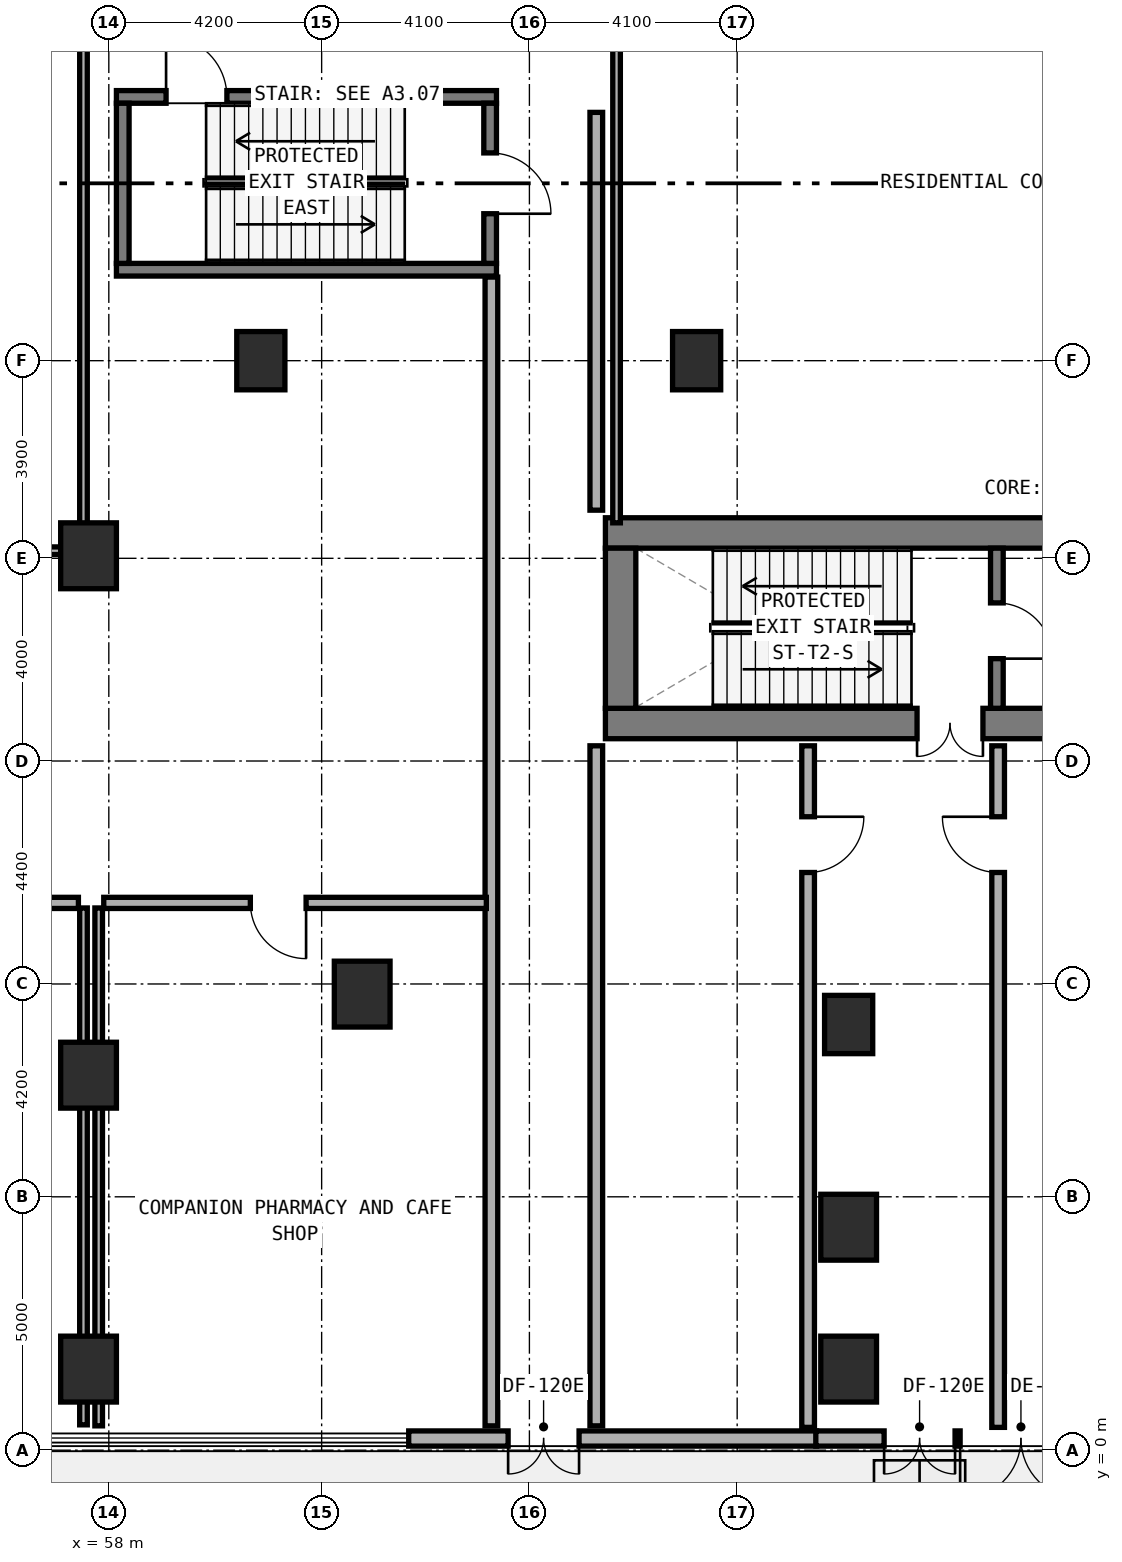
"""IFC4 building model, lengths in metres.
Left out: names, types, materials, properties, quantities, classifications, styles, units other than length and angle.
Written with IfcOpenShell. Run it as: python <this file> out.ifc"""

import sys

from ifc_helpers import new_model, si_unit, direction, frame, frame_2d, origin, origin_2d, place, context, subcontext, project, spatial, rectangle, extrude, element, fill, save


model = new_model("IFC4")
c1 = context("Model", 3, precision=1e-05, world=origin(), true_north=direction((0.0, 1.0)))
c2 = subcontext(c1, "Body", "Model", "MODEL_VIEW")
j1 = project(units=[si_unit("LENGTHUNIT", "METRE"), si_unit("PLANEANGLEUNIT", "RADIAN")], contexts=[c1])
p1 = place(None, origin())
s1 = spatial("IfcSite", under=j1, at=p1, CompositionType="ELEMENT")
p2 = place(p1, origin())
s2 = spatial("IfcBuilding", under=s1, at=p2, CompositionType="ELEMENT")
p3 = place(p2, origin())
s3 = spatial("IfcBuildingStorey", under=s2, at=p3, CompositionType="ELEMENT", Elevation=0.0)
p4 = place(p3, frame((67.8, 14.34, 0.0), z_axis=(0.0, 0.0, 1.0), x_axis=(1.0, 0.0, 0.0)))
e1 = element("IfcWall", 1, at=p4, inside=s3, PredefinedType="SHEAR", context=c2, shape_type="SweptSolid", body=[
    extrude(rectangle(XDim=18.6, YDim=0.6, at=frame_2d((9.3, 0.0))), origin(), (0.0, 0.0, 1.0), 5.4),
])
p5 = place(p4, frame((9.35, 0.0, 0.0)))
e2 = element("IfcOpeningElement", 2, at=p5, cuts=e1, PredefinedType="OPENING", context=c2, shape_type="SweptSolid", body=[
    extrude(rectangle(XDim=1.2, YDim=2.15, at=frame_2d((0.6, 1.075))), frame((0.0, 0.31, 0.0), z_axis=(0.0, -1.0, 0.0), x_axis=(1.0, 0.0, 0.0)), (0.0, 0.0, 1.0), 0.62),
])
p6 = place(p4, frame((6.15, 0.0, 0.0)))
e3 = element("IfcOpeningElement", 3, at=p6, cuts=e1, PredefinedType="OPENING", context=c2, shape_type="SweptSolid", body=[
    extrude(rectangle(XDim=1.3, YDim=2.15, at=frame_2d((0.65, 1.075))), frame((0.0, 0.31, 0.0), z_axis=(0.0, -1.0, 0.0), x_axis=(1.0, 0.0, 0.0)), (0.0, 0.0, 1.0), 0.62),
])
p7 = place(p4, frame((16.95, 0.0, 0.0)))
e4 = element("IfcOpeningElement", 4, at=p7, cuts=e1, PredefinedType="OPENING", context=c2, shape_type="SweptSolid", body=[
    extrude(rectangle(XDim=0.85, YDim=2.1, at=frame_2d((0.425, 1.05))), frame((0.0, 0.31, 0.0), z_axis=(0.0, -1.0, 0.0), x_axis=(1.0, 0.0, 0.0)), (0.0, 0.0, 1.0), 0.62),
])
p8 = place(p4, frame((12.55, 0.0, 0.0)))
e5 = element("IfcOpeningElement", 5, at=p8, cuts=e1, PredefinedType="OPENING", context=c2, shape_type="SweptSolid", body=[
    extrude(rectangle(XDim=1.1, YDim=2.15, at=frame_2d((0.55, 1.075))), frame((0.0, 0.31, 0.0), z_axis=(0.0, -1.0, 0.0), x_axis=(1.0, 0.0, 0.0)), (0.0, 0.0, 1.0), 0.62),
])
p9 = place(p4, frame((14.15, 0.0, 0.0)))
e6 = element("IfcOpeningElement", 6, at=p9, cuts=e1, PredefinedType="OPENING", context=c2, shape_type="SweptSolid", body=[
    extrude(rectangle(XDim=1.1, YDim=2.15, at=frame_2d((0.55, 1.075))), frame((0.0, 0.31, 0.0), z_axis=(0.0, -1.0, 0.0), x_axis=(1.0, 0.0, 0.0)), (0.0, 0.0, 1.0), 0.62),
])
p10 = place(p3, frame((67.8, 18.1, 0.0), z_axis=(0.0, 0.0, 1.0), x_axis=(1.0, 0.0, 0.0)))
e7 = element("IfcWall", 7, at=p10, inside=s3, PredefinedType="SHEAR", context=c2, shape_type="SweptSolid", body=[
    extrude(rectangle(XDim=18.6, YDim=0.6, at=frame_2d((9.3, 0.0))), origin(), (0.0, 0.0, 1.0), 5.4),
])
p11 = place(p3, frame((68.1, 14.64, 0.0), z_axis=(0.0, 0.0, 1.0), x_axis=(0.0, 1.0, 0.0)))
e8 = element("IfcWall", 8, at=p11, inside=s3, PredefinedType="SHEAR", context=c2, shape_type="SweptSolid", body=[
    extrude(rectangle(XDim=3.16, YDim=0.6, at=frame_2d((1.58, 0.0))), origin(), (0.0, 0.0, 1.0), 5.4),
])
p12 = place(p3, frame((75.525, 14.64, 0.0), z_axis=(0.0, 0.0, 1.0), x_axis=(0.0, 1.0, 0.0)))
e9 = element("IfcWall", 9, at=p12, inside=s3, PredefinedType="STANDARD", context=c2, shape_type="SweptSolid", body=[
    extrude(rectangle(XDim=3.16, YDim=0.25, at=frame_2d((1.58, 0.0))), origin(), (0.0, 0.0, 1.0), 5.05),
])
p13 = place(p12, frame((0.98, 0.0, 0.0)))
e10 = element("IfcOpeningElement", 10, at=p13, cuts=e9, PredefinedType="OPENING", context=c2, shape_type="SweptSolid", body=[
    extrude(rectangle(XDim=1.1, YDim=2.15, at=frame_2d((0.55, 1.075))), frame((0.0, 0.135, 0.0), z_axis=(0.0, -1.0, 0.0), x_axis=(1.0, 0.0, 0.0)), (0.0, 0.0, 1.0), 0.27),
])
p14 = place(p3, frame((58.15, 23.295, 0.0), z_axis=(0.0, 0.0, 1.0), x_axis=(1.0, 0.0, 0.0)))
e11 = element("IfcWall", 11, at=p14, inside=s3, PredefinedType="STANDARD", context=c2, shape_type="SweptSolid", body=[
    extrude(rectangle(XDim=7.5, YDim=0.25, at=frame_2d((3.75, 0.0))), origin(), (0.0, 0.0, 1.0), 5.4),
])
p15 = place(p3, frame((58.15, 26.705, 0.0), z_axis=(0.0, 0.0, 1.0), x_axis=(1.0, 0.0, 0.0)))
e12 = element("IfcWall", 12, at=p15, inside=s3, PredefinedType="STANDARD", context=c2, shape_type="SweptSolid", body=[
    extrude(rectangle(XDim=7.5, YDim=0.25, at=frame_2d((3.75, 0.0))), origin(), (0.0, 0.0, 1.0), 5.4),
])
p16 = place(p15, frame((0.98, 0.0, 0.0)))
e13 = element("IfcOpeningElement", 13, at=p16, cuts=e12, PredefinedType="OPENING", context=c2, shape_type="SweptSolid", body=[
    extrude(rectangle(XDim=1.2, YDim=2.15, at=frame_2d((0.6, 1.075))), frame((0.0, 0.135, 0.0), z_axis=(0.0, -1.0, 0.0), x_axis=(1.0, 0.0, 0.0)), (0.0, 0.0, 1.0), 0.27),
])
p17 = place(p3, frame((58.275, 23.42, 0.0), z_axis=(0.0, 0.0, 1.0), x_axis=(0.0, 1.0, 0.0)))
e14 = element("IfcWall", 14, at=p17, inside=s3, PredefinedType="STANDARD", context=c2, shape_type="SweptSolid", body=[
    extrude(rectangle(XDim=3.16, YDim=0.25, at=frame_2d((1.58, 0.0))), origin(), (0.0, 0.0, 1.0), 5.4),
])
p18 = place(p3, frame((65.525, 23.42, 0.0), z_axis=(0.0, 0.0, 1.0), x_axis=(0.0, 1.0, 0.0)))
e15 = element("IfcWall", 15, at=p18, inside=s3, PredefinedType="STANDARD", context=c2, shape_type="SweptSolid", body=[
    extrude(rectangle(XDim=3.16, YDim=0.25, at=frame_2d((1.58, 0.0))), origin(), (0.0, 0.0, 1.0), 5.4),
])
p19 = place(p18, frame((0.98, 0.0, 0.0)))
e16 = element("IfcOpeningElement", 16, at=p19, cuts=e15, PredefinedType="OPENING", context=c2, shape_type="SweptSolid", body=[
    extrude(rectangle(XDim=1.2, YDim=2.15, at=frame_2d((0.6, 1.075))), frame((0.0, 0.135, 0.0), z_axis=(0.0, -1.0, 0.0), x_axis=(1.0, 0.0, 0.0)), (0.0, 0.0, 1.0), 0.27),
])
for number, where, z_axis, x_axis in (
    (17, (72.6, 8.4, 0.0), (0.0, 0.0, 1.0), (1.0, 0.0, 0.0)),
    (18, (61.0, 21.5, 0.0), (0.0, 0.0, 1.0), (1.0, 0.0, 0.0)),
):
    element("IfcColumn", number, at=place(p3, frame(where, z_axis=z_axis, x_axis=x_axis)), inside=s3, PredefinedType="COLUMN", context=c2, shape_type="SweptSolid", body=[
        extrude(rectangle(XDim=0.95, YDim=1.15, at=origin_2d()), origin(), (0.0, 0.0, 1.0), 5.4),
    ])
p20 = place(p3, frame((63.0, 9.0, 0.0), z_axis=(0.0, 0.0, 1.0), x_axis=(1.0, 0.0, 0.0)))
e19 = element("IfcColumn", 19, at=p20, inside=s3, PredefinedType="COLUMN", context=c2, shape_type="SweptSolid", body=[
    extrude(rectangle(XDim=1.1, YDim=1.3, at=origin_2d()), origin(), (0.0, 0.0, 1.0), 5.4),
])
p21 = place(p3, frame((69.6, 21.5, 0.0), z_axis=(0.0, 0.0, 1.0), x_axis=(1.0, 0.0, 0.0)))
e20 = element("IfcColumn", 20, at=p21, inside=s3, PredefinedType="COLUMN", context=c2, shape_type="SweptSolid", body=[
    extrude(rectangle(XDim=0.95, YDim=1.15, at=origin_2d()), origin(), (0.0, 0.0, 1.0), 5.4),
])
for number, where, z_axis, x_axis in (
    (21, (57.6, 17.65, 0.0), (0.0, 0.0, 1.0), (1.0, 0.0, 0.0)),
    (22, (57.6, 1.6, 0.0), (0.0, 0.0, 1.0), (1.0, 0.0, 0.0)),
    (23, (72.6, 1.6, 0.0), (0.0, 0.0, 1.0), (1.0, 0.0, 0.0)),
    (24, (72.6, 4.4, 0.0), (0.0, 0.0, 1.0), (1.0, 0.0, 0.0)),
    (25, (57.6, 7.4, 0.0), (0.0, 0.0, 1.0), (1.0, 0.0, 0.0)),
):
    element("IfcColumn", number, at=place(p3, frame(where, z_axis=z_axis, x_axis=x_axis)), inside=s3, PredefinedType="COLUMN", context=c2, shape_type="SweptSolid", body=[
        extrude(rectangle(XDim=1.1, YDim=1.3, at=origin_2d()), origin(), (0.0, 0.0, 1.0), 5.4),
    ])
p22 = place(p3, frame((63.918, 0.23, 0.0), z_axis=(0.0, 0.0, 1.0), x_axis=(1.0, 0.0, 0.0)))
e26 = element("IfcWall", 26, at=p22, inside=s3, PredefinedType="STANDARD", context=c2, shape_type="SweptSolid", body=[
    extrude(rectangle(XDim=8.05, YDim=0.3, at=frame_2d((4.025, 0.0))), origin(), (0.0, 0.0, 1.0), 5.05),
])
p23 = place(p22, frame((1.962, 0.0, 0.0)))
e27 = element("IfcOpeningElement", 27, at=p23, cuts=e26, PredefinedType="OPENING", context=c2, shape_type="SweptSolid", body=[
    extrude(rectangle(XDim=1.4, YDim=2.2, at=frame_2d((0.7, 1.1))), frame((0.0, 0.16, 0.0), z_axis=(0.0, -1.0, 0.0), x_axis=(1.0, 0.0, 0.0)), (0.0, 0.0, 1.0), 0.32),
])
p24 = place(p3, frame((71.952, 0.23, 0.0), z_axis=(0.0, 0.0, 1.0), x_axis=(1.0, 0.0, 0.0)))
e28 = element("IfcWall", 28, at=p24, inside=s3, PredefinedType="STANDARD", context=c2, shape_type="SweptSolid", body=[
    extrude(rectangle(XDim=8.05, YDim=0.3, at=frame_2d((4.025, 0.0))), origin(), (0.0, 0.0, 1.0), 5.05),
])
p25 = place(p24, frame((1.348, 0.0, 0.0)))
e29 = element("IfcOpeningElement", 29, at=p25, cuts=e28, PredefinedType="OPENING", context=c2, shape_type="SweptSolid", body=[
    extrude(rectangle(XDim=1.4, YDim=2.2, at=frame_2d((0.7, 1.1))), frame((0.0, 0.16, 0.0), z_axis=(0.0, -1.0, 0.0), x_axis=(1.0, 0.0, 0.0)), (0.0, 0.0, 1.0), 0.32),
])
p26 = place(p24, frame((2.848, 0.0, 0.0)))
e30 = element("IfcOpeningElement", 30, at=p26, cuts=e28, PredefinedType="OPENING", context=c2, shape_type="SweptSolid", body=[
    extrude(rectangle(XDim=2.4, YDim=2.6, at=frame_2d((1.2, 1.3))), frame((0.0, 0.16, 0.0), z_axis=(0.0, -1.0, 0.0), x_axis=(1.0, 0.0, 0.0)), (0.0, 0.0, 1.0), 0.32),
])
p27 = place(p3, frame((71.8, 0.45, 0.0), z_axis=(0.0, 0.0, 1.0), x_axis=(0.0, 1.0, 0.0)))
e31 = element("IfcWall", 31, at=p27, inside=s3, PredefinedType="SOLIDWALL", context=c2, shape_type="SweptSolid", body=[
    extrude(rectangle(XDim=13.45, YDim=0.25, at=frame_2d((6.725, 0.0))), origin(), (0.0, 0.0, 1.0), 4.225),
])
p28 = place(p27, frame((10.95, 0.0, 0.0)))
e32 = element("IfcOpeningElement", 32, at=p28, cuts=e31, PredefinedType="OPENING", context=c2, shape_type="SweptSolid", body=[
    extrude(rectangle(XDim=1.1, YDim=2.15, at=frame_2d((0.55, 1.075))), frame((0.0, 0.135, 0.0), z_axis=(0.0, -1.0, 0.0), x_axis=(1.0, 0.0, 0.0)), (0.0, 0.0, 1.0), 0.27),
])
p29 = place(p3, frame((75.55, 0.45, 0.0), z_axis=(0.0, 0.0, 1.0), x_axis=(0.0, 1.0, 0.0)))
e33 = element("IfcWall", 33, at=p29, inside=s3, PredefinedType="SOLIDWALL", context=c2, shape_type="SweptSolid", body=[
    extrude(rectangle(XDim=13.45, YDim=0.25, at=frame_2d((6.725, 0.0))), origin(), (0.0, 0.0, 1.0), 4.425),
])
p30 = place(p29, frame((10.95, 0.0, 0.0)))
e34 = element("IfcOpeningElement", 34, at=p30, cuts=e33, PredefinedType="OPENING", context=c2, shape_type="SweptSolid", body=[
    extrude(rectangle(XDim=1.1, YDim=2.15, at=frame_2d((0.55, 1.075))), frame((0.0, 0.135, 0.0), z_axis=(0.0, -1.0, 0.0), x_axis=(1.0, 0.0, 0.0)), (0.0, 0.0, 1.0), 0.27),
])
p31 = place(p3, frame((65.55, 0.48, 0.0), z_axis=(0.0, 0.0, 1.0), x_axis=(0.0, 1.0, 0.0)))
e35 = element("IfcWall", 35, at=p31, inside=s3, PredefinedType="SOLIDWALL", context=c2, shape_type="SweptSolid", body=[
    extrude(rectangle(XDim=22.67, YDim=0.25, at=frame_2d((11.335, 0.0))), origin(), (0.0, 0.0, 1.0), 4.225),
])
p32 = place(p3, frame((67.62, 0.48, 0.0), z_axis=(0.0, 0.0, 1.0), x_axis=(0.0, 1.0, 0.0)))
e36 = element("IfcWall", 36, at=p32, inside=s3, PredefinedType="SOLIDWALL", context=c2, shape_type="SweptSolid", body=[
    extrude(rectangle(XDim=13.42, YDim=0.25, at=frame_2d((6.71, 0.0))), origin(), (0.0, 0.0, 1.0), 4.225),
])
p33 = place(p3, frame((67.62, 18.55, 0.0), z_axis=(0.0, 0.0, 1.0), x_axis=(0.0, 1.0, 0.0)))
e37 = element("IfcWall", 37, at=p33, inside=s3, PredefinedType="SOLIDWALL", context=c2, shape_type="SweptSolid", body=[
    extrude(rectangle(XDim=7.85, YDim=0.25, at=frame_2d((3.925, 0.0))), origin(), (0.0, 0.0, 1.0), 4.525),
])
p34 = place(p3, frame((57.5, 0.5, 0.0), z_axis=(0.0, 0.0, 1.0), x_axis=(0.0, 1.0, 0.0)))
e38 = element("IfcWall", 38, at=p34, inside=s3, PredefinedType="PARTITIONING", context=c2, shape_type="SweptSolid", body=[
    extrude(rectangle(XDim=10.2, YDim=0.15, at=frame_2d((5.1, 0.0))), origin(), (0.0, 0.0, 1.0), 4.225),
])
p35 = place(p3, frame((42.0, 10.8, 0.0), z_axis=(0.0, 0.0, 1.0), x_axis=(1.0, 0.0, 0.0)))
e39 = element("IfcWall", 39, at=p35, inside=s3, PredefinedType="SOLIDWALL", context=c2, shape_type="SweptSolid", body=[
    extrude(rectangle(XDim=15.4, YDim=0.22, at=frame_2d((7.7, 0.0))), origin(), (0.0, 0.0, 1.0), 5.05),
])
p36 = place(p35, frame((6.425, 0.0, 0.0)))
e40 = element("IfcOpeningElement", 40, at=p36, cuts=e39, PredefinedType="OPENING", context=c2, shape_type="SweptSolid", body=[
    extrude(rectangle(XDim=1.1, YDim=2.1, at=frame_2d((0.55, 1.05))), frame((0.0, 0.12, 0.0), z_axis=(0.0, -1.0, 0.0), x_axis=(1.0, 0.0, 0.0)), (0.0, 0.0, 1.0), 0.24),
])
p37 = place(p3, frame((57.5, 17.85, 0.0), z_axis=(0.0, 0.0, 1.0), x_axis=(0.0, 1.0, 0.0)))
e41 = element("IfcWall", 41, at=p37, inside=s3, PredefinedType="PARTITIONING", context=c2, shape_type="SweptSolid", body=[
    extrude(rectangle(XDim=18.8, YDim=0.15, at=frame_2d((9.4, 0.0))), origin(), (0.0, 0.0, 1.0), 3.325),
])
p38 = place(p3, frame((42.0, 17.75, 0.0), z_axis=(0.0, 0.0, 1.0), x_axis=(1.0, 0.0, 0.0)))
e42 = element("IfcWall", 42, at=p38, inside=s3, PredefinedType="PARTITIONING", context=c2, shape_type="SweptSolid", body=[
    extrude(rectangle(XDim=15.4, YDim=0.15, at=frame_2d((7.7, 0.0))), origin(), (0.0, 0.0, 1.0), 4.325),
])
p39 = place(p3, frame((68.02, 18.3, 0.0), z_axis=(0.0, 0.0, 1.0), x_axis=(0.0, 1.0, 0.0)))
e43 = element("IfcWall", 43, at=p39, inside=s3, PredefinedType="PARTITIONING", context=c2, shape_type="SweptSolid", body=[
    extrude(rectangle(XDim=13.4, YDim=0.15, at=frame_2d((6.7, 0.0))), origin(), (0.0, 0.0, 1.0), 4.525),
])
p40 = place(p3, frame((57.8, 0.48, 0.0), z_axis=(0.0, 0.0, 1.0), x_axis=(0.0, 1.0, 0.0)))
e44 = element("IfcWall", 44, at=p40, inside=s3, PredefinedType="PARTITIONING", context=c2, shape_type="SweptSolid", body=[
    extrude(rectangle(XDim=10.22, YDim=0.15, at=frame_2d((5.11, 0.0))), origin(), (0.0, 0.0, 1.0), 4.225),
])
p41 = place(p3, frame((57.9, 10.8, 0.0), z_axis=(0.0, 0.0, 1.0), x_axis=(1.0, 0.0, 0.0)))
e45 = element("IfcWall", 45, at=p41, inside=s3, PredefinedType="SOLIDWALL", context=c2, shape_type="SweptSolid", body=[
    extrude(rectangle(XDim=7.55, YDim=0.22, at=frame_2d((3.775, 0.0))), origin(), (0.0, 0.0, 1.0), 4.665),
])
p42 = place(p41, frame((2.893, 0.0, 0.0)))
e46 = element("IfcOpeningElement", 46, at=p42, cuts=e45, PredefinedType="OPENING", context=c2, shape_type="SweptSolid", body=[
    extrude(rectangle(XDim=1.1, YDim=2.1, at=frame_2d((0.55, 1.05))), frame((0.0, 0.12, 0.0), z_axis=(0.0, -1.0, 0.0), x_axis=(1.0, 0.0, 0.0)), (0.0, 0.0, 1.0), 0.24),
])
p43 = place(p23, frame((1.4, 0.0, 0.0), z_axis=(0.0, 0.0, 1.0), x_axis=(-1.0, 0.0, 0.0)))
e47 = element("IfcDoor", 47, at=p43, inside=s3, OperationType="DOUBLE_DOOR_SINGLE_SWING", PredefinedType="DOOR", context=c2, shape_type="SweptSolid", body=[
    extrude(rectangle(XDim=1.4, YDim=2.2, at=frame_2d((0.7, 1.1))), frame((0.0, 0.025, 0.0), z_axis=(0.0, -1.0, 0.0), x_axis=(1.0, 0.0, 0.0)), (0.0, 0.0, 1.0), 0.05),
])
fill(e27, e47)
p44 = place(p25, frame((1.4, 0.0, 0.0), z_axis=(0.0, 0.0, 1.0), x_axis=(-1.0, 0.0, 0.0)))
e48 = element("IfcDoor", 48, at=p44, inside=s3, OperationType="DOUBLE_DOOR_SINGLE_SWING", PredefinedType="DOOR", context=c2, shape_type="SweptSolid", body=[
    extrude(rectangle(XDim=1.4, YDim=2.2, at=frame_2d((0.7, 1.1))), frame((0.0, 0.025, 0.0), z_axis=(0.0, -1.0, 0.0), x_axis=(1.0, 0.0, 0.0)), (0.0, 0.0, 1.0), 0.05),
])
fill(e29, e48)
p45 = place(p26, frame((2.4, 0.0, 0.0), z_axis=(0.0, 0.0, 1.0), x_axis=(-1.0, 0.0, 0.0)))
e49 = element("IfcDoor", 49, at=p45, inside=s3, OperationType="DOUBLE_DOOR_SINGLE_SWING", PredefinedType="DOOR", context=c2, shape_type="SweptSolid", body=[
    extrude(rectangle(XDim=2.4, YDim=2.6, at=frame_2d((1.2, 1.3))), frame((0.0, 0.025, 0.0), z_axis=(0.0, -1.0, 0.0), x_axis=(1.0, 0.0, 0.0)), (0.0, 0.0, 1.0), 0.05),
])
fill(e30, e49)
p46 = place(p13, frame((1.1, 0.0, 0.0), z_axis=(0.0, 0.0, 1.0), x_axis=(-1.0, 0.0, 0.0)))
e50 = element("IfcDoor", 50, at=p46, inside=s3, OperationType="SINGLE_SWING_RIGHT", PredefinedType="DOOR", context=c2, shape_type="SweptSolid", body=[
    extrude(rectangle(XDim=1.1, YDim=2.15, at=frame_2d((0.55, 1.075))), frame((0.0, 0.025, 0.0), z_axis=(0.0, -1.0, 0.0), x_axis=(1.0, 0.0, 0.0)), (0.0, 0.0, 1.0), 0.05),
])
fill(e10, e50)
p47 = place(p6, frame((1.3, 0.0, 0.0), z_axis=(0.0, 0.0, 1.0), x_axis=(-1.0, 0.0, 0.0)))
e51 = element("IfcDoor", 51, at=p47, inside=s3, OperationType="DOUBLE_DOOR_SINGLE_SWING", PredefinedType="DOOR", context=c2, shape_type="SweptSolid", body=[
    extrude(rectangle(XDim=1.3, YDim=2.15, at=frame_2d((0.65, 1.075))), frame((0.0, 0.025, 0.0), z_axis=(0.0, -1.0, 0.0), x_axis=(1.0, 0.0, 0.0)), (0.0, 0.0, 1.0), 0.05),
])
fill(e3, e51)
p48 = place(p16, origin())
e52 = element("IfcDoor", 52, at=p48, inside=s3, OperationType="SINGLE_SWING_LEFT", PredefinedType="DOOR", context=c2, shape_type="SweptSolid", body=[
    extrude(rectangle(XDim=1.2, YDim=2.15, at=frame_2d((0.6, 1.075))), frame((0.0, 0.025, 0.0), z_axis=(0.0, -1.0, 0.0), x_axis=(1.0, 0.0, 0.0)), (0.0, 0.0, 1.0), 0.05),
])
fill(e13, e52)
p49 = place(p19, frame((1.2, 0.0, 0.0), z_axis=(0.0, 0.0, 1.0), x_axis=(-1.0, 0.0, 0.0)))
e53 = element("IfcDoor", 53, at=p49, inside=s3, OperationType="SINGLE_SWING_RIGHT", PredefinedType="DOOR", context=c2, shape_type="SweptSolid", body=[
    extrude(rectangle(XDim=1.2, YDim=2.15, at=frame_2d((0.6, 1.075))), frame((0.0, 0.025, 0.0), z_axis=(0.0, -1.0, 0.0), x_axis=(1.0, 0.0, 0.0)), (0.0, 0.0, 1.0), 0.05),
])
fill(e16, e53)
p50 = place(p28, frame((1.1, 0.0, 0.0), z_axis=(0.0, 0.0, 1.0), x_axis=(-1.0, 0.0, 0.0)))
e54 = element("IfcDoor", 54, at=p50, inside=s3, OperationType="SINGLE_SWING_LEFT", PredefinedType="DOOR", context=c2, shape_type="SweptSolid", body=[
    extrude(rectangle(XDim=1.1, YDim=2.15, at=frame_2d((0.55, 1.075))), frame((0.0, 0.025, 0.0), z_axis=(0.0, -1.0, 0.0), x_axis=(1.0, 0.0, 0.0)), (0.0, 0.0, 1.0), 0.05),
])
fill(e32, e54)
p51 = place(p30, origin())
e55 = element("IfcDoor", 55, at=p51, inside=s3, OperationType="SINGLE_SWING_RIGHT", PredefinedType="DOOR", context=c2, shape_type="SweptSolid", body=[
    extrude(rectangle(XDim=1.1, YDim=2.15, at=frame_2d((0.55, 1.075))), frame((0.0, 0.025, 0.0), z_axis=(0.0, -1.0, 0.0), x_axis=(1.0, 0.0, 0.0)), (0.0, 0.0, 1.0), 0.05),
])
fill(e34, e55)
p52 = place(p42, frame((1.1, 0.0, 0.0), z_axis=(0.0, 0.0, 1.0), x_axis=(-1.0, 0.0, 0.0)))
e56 = element("IfcDoor", 56, at=p52, inside=s3, OperationType="SINGLE_SWING_LEFT", PredefinedType="DOOR", context=c2, shape_type="SweptSolid", body=[
    extrude(rectangle(XDim=1.1, YDim=2.1, at=frame_2d((0.55, 1.05))), frame((0.0, 0.025, 0.0), z_axis=(0.0, -1.0, 0.0), x_axis=(1.0, 0.0, 0.0)), (0.0, 0.0, 1.0), 0.05),
])
fill(e46, e56)
save(model, sys.argv[1])
